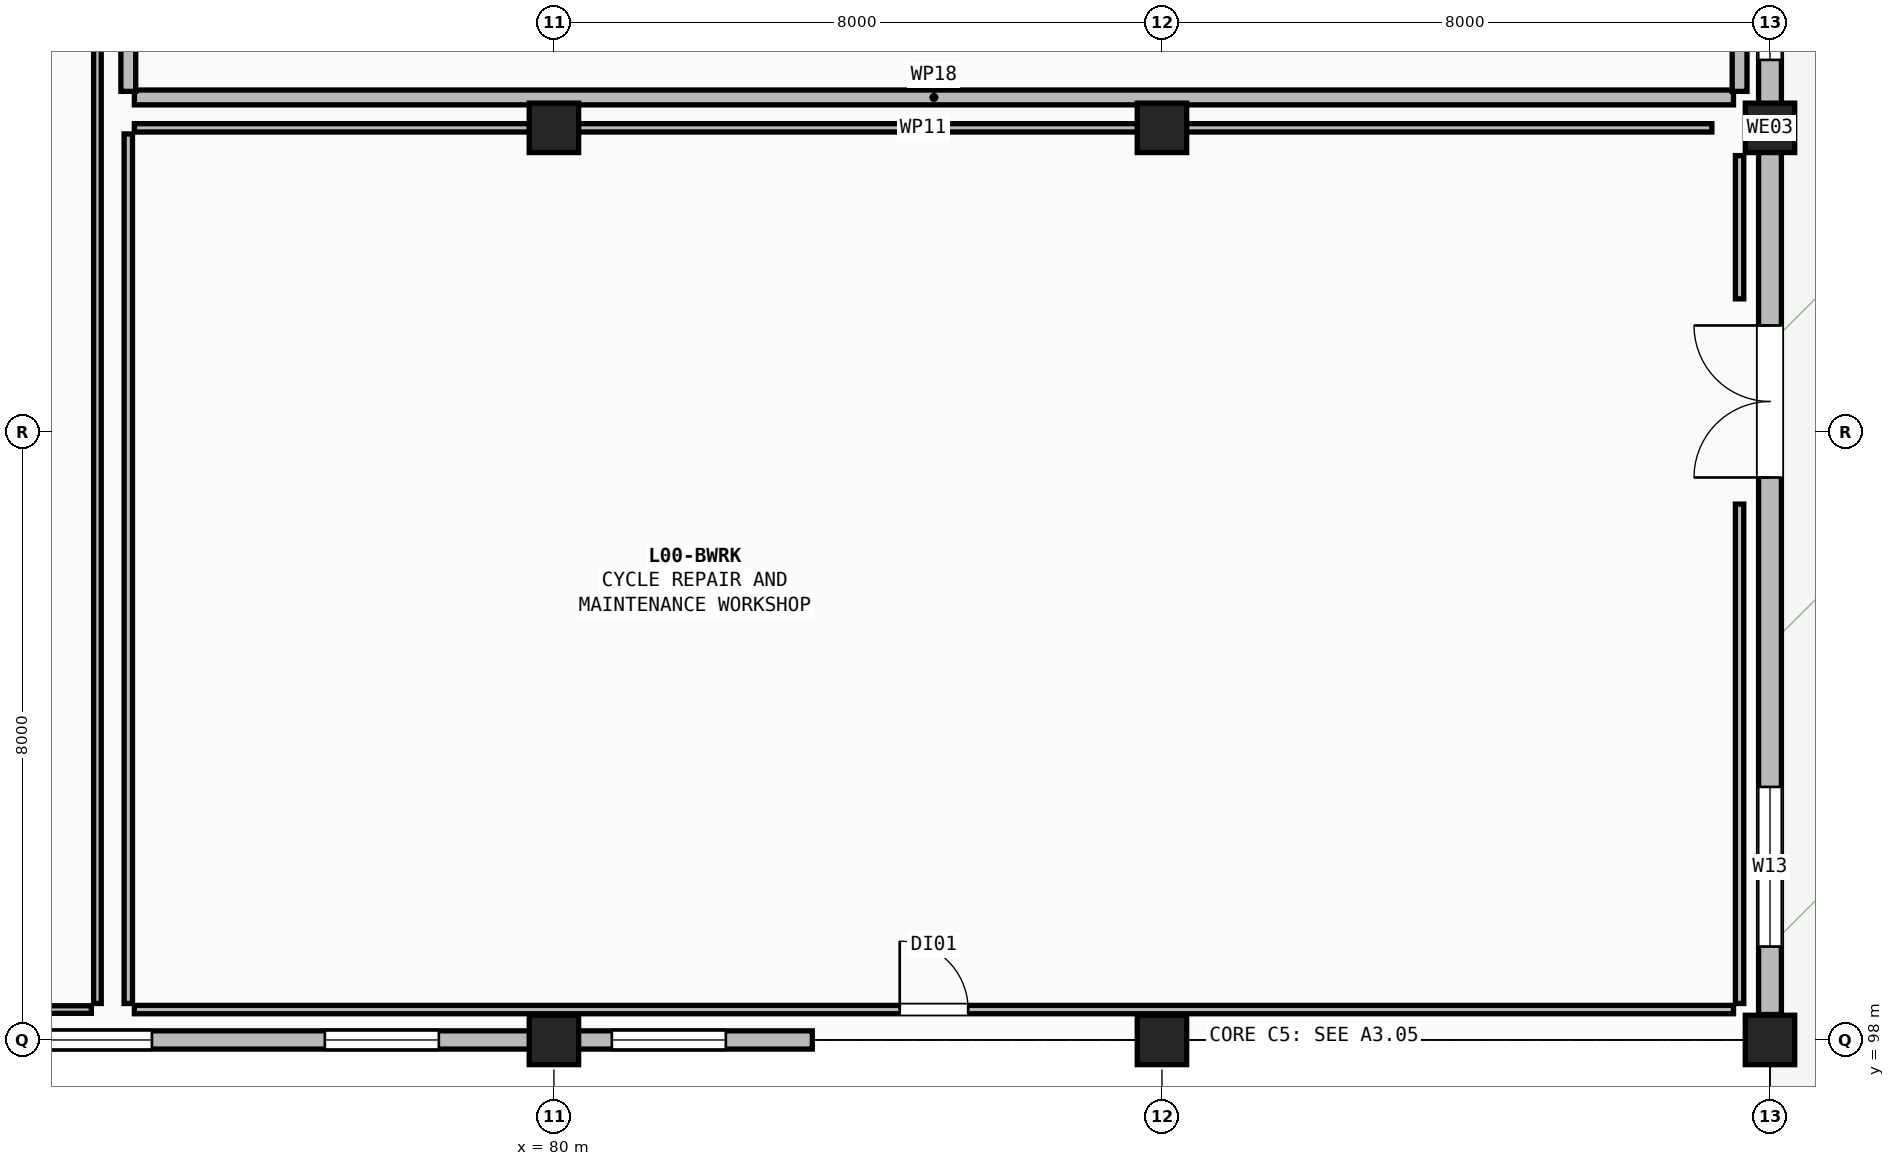
"""IFC4 building model, lengths in metres.
Left out: names, types, materials, properties, quantities, classifications, styles, units other than length and angle.
Written with IfcOpenShell. Run it as: python <this file> out.ifc"""

import sys

from ifc_helpers import new_model, si_unit, direction, frame, frame_2d, origin, origin_2d, place, context, subcontext, project, spatial, rectangle, extrude, element, fill, save


model = new_model("IFC4")
c1 = context("Model", 3, precision=1e-05, world=origin(), true_north=direction((0.0, 1.0)))
c2 = subcontext(c1, "Body", "Model", "MODEL_VIEW")
j1 = project(units=[si_unit("LENGTHUNIT", "METRE"), si_unit("PLANEANGLEUNIT", "RADIAN")], contexts=[c1])
p1 = place(None, origin())
s1 = spatial("IfcSite", under=j1, at=p1, CompositionType="ELEMENT")
p2 = place(p1, origin())
s2 = spatial("IfcBuilding", under=s1, at=p2, CompositionType="ELEMENT")
p3 = place(p2, origin())
s3 = spatial("IfcBuildingStorey", under=s2, at=p3, CompositionType="ELEMENT", Elevation=0.0)
for number, where, z_axis, x_axis in (
    (1, (80.0, 98.0, 0.0), (0.0, 0.0, 1.0), (1.0, 0.0, 0.0)),
    (2, (80.0, 110.0, 0.0), (0.0, 0.0, 1.0), (1.0, 0.0, 0.0)),
    (3, (88.0, 98.0, 0.0), (0.0, 0.0, 1.0), (1.0, 0.0, 0.0)),
    (4, (88.0, 110.0, 0.0), (0.0, 0.0, 1.0), (1.0, 0.0, 0.0)),
    (5, (96.0, 98.0, 0.0), (0.0, 0.0, 1.0), (1.0, 0.0, 0.0)),
    (6, (96.0, 110.0, 0.0), (0.0, 0.0, 1.0), (1.0, 0.0, 0.0)),
):
    element("IfcColumn", number, at=place(p3, frame(where, z_axis=z_axis, x_axis=x_axis)), inside=s3, PredefinedType="COLUMN", context=c2, shape_type="SweptSolid", body=[
        extrude(rectangle(XDim=0.65, YDim=0.65, at=origin_2d()), origin(), (0.0, 0.0, 1.0), 4.5),
    ])
p4 = place(p3, frame((0.335, 98.0, 0.0), z_axis=(0.0, 0.0, 1.0), x_axis=(1.0, 0.0, 0.0)))
e7 = element("IfcWall", 7, at=p4, inside=s3, PredefinedType="SOLIDWALL", context=c2, shape_type="SweptSolid", body=[
    extrude(rectangle(XDim=83.065, YDim=0.24, at=frame_2d((41.532, 0.0))), origin(), (0.0, 0.0, 1.0), 3.245),
])
p5 = place(p4, frame((1.138, 0.0, 0.95)))
e8 = element("IfcOpeningElement", 8, at=p5, cuts=e7, PredefinedType="OPENING", context=c2, shape_type="SweptSolid", body=[
    extrude(rectangle(XDim=1.5, YDim=1.5, at=frame_2d((0.75, 0.75))), frame((0.0, 0.13, 0.0), z_axis=(0.0, -1.0, 0.0), x_axis=(1.0, 0.0, 0.0)), (0.0, 0.0, 1.0), 0.26),
])
p6 = place(p4, frame((4.914, 0.0, 0.95)))
e9 = element("IfcOpeningElement", 9, at=p6, cuts=e7, PredefinedType="OPENING", context=c2, shape_type="SweptSolid", body=[
    extrude(rectangle(XDim=1.5, YDim=1.5, at=frame_2d((0.75, 0.75))), frame((0.0, 0.13, 0.0), z_axis=(0.0, -1.0, 0.0), x_axis=(1.0, 0.0, 0.0)), (0.0, 0.0, 1.0), 0.26),
])
p7 = place(p4, frame((8.689, 0.0, 0.95)))
e10 = element("IfcOpeningElement", 10, at=p7, cuts=e7, PredefinedType="OPENING", context=c2, shape_type="SweptSolid", body=[
    extrude(rectangle(XDim=1.5, YDim=1.5, at=frame_2d((0.75, 0.75))), frame((0.0, 0.13, 0.0), z_axis=(0.0, -1.0, 0.0), x_axis=(1.0, 0.0, 0.0)), (0.0, 0.0, 1.0), 0.26),
])
p8 = place(p4, frame((12.465, 0.0, 0.95)))
e11 = element("IfcOpeningElement", 11, at=p8, cuts=e7, PredefinedType="OPENING", context=c2, shape_type="SweptSolid", body=[
    extrude(rectangle(XDim=1.5, YDim=1.5, at=frame_2d((0.75, 0.75))), frame((0.0, 0.13, 0.0), z_axis=(0.0, -1.0, 0.0), x_axis=(1.0, 0.0, 0.0)), (0.0, 0.0, 1.0), 0.26),
])
p9 = place(p4, frame((16.241, 0.0, 0.95)))
e12 = element("IfcOpeningElement", 12, at=p9, cuts=e7, PredefinedType="OPENING", context=c2, shape_type="SweptSolid", body=[
    extrude(rectangle(XDim=1.5, YDim=1.5, at=frame_2d((0.75, 0.75))), frame((0.0, 0.13, 0.0), z_axis=(0.0, -1.0, 0.0), x_axis=(1.0, 0.0, 0.0)), (0.0, 0.0, 1.0), 0.26),
])
p10 = place(p4, frame((20.016, 0.0, 0.95)))
e13 = element("IfcOpeningElement", 13, at=p10, cuts=e7, PredefinedType="OPENING", context=c2, shape_type="SweptSolid", body=[
    extrude(rectangle(XDim=1.5, YDim=1.5, at=frame_2d((0.75, 0.75))), frame((0.0, 0.13, 0.0), z_axis=(0.0, -1.0, 0.0), x_axis=(1.0, 0.0, 0.0)), (0.0, 0.0, 1.0), 0.26),
])
p11 = place(p4, frame((27.568, 0.0, 0.95)))
e14 = element("IfcOpeningElement", 14, at=p11, cuts=e7, PredefinedType="OPENING", context=c2, shape_type="SweptSolid", body=[
    extrude(rectangle(XDim=1.5, YDim=1.5, at=frame_2d((0.75, 0.75))), frame((0.0, 0.13, 0.0), z_axis=(0.0, -1.0, 0.0), x_axis=(1.0, 0.0, 0.0)), (0.0, 0.0, 1.0), 0.26),
])
p12 = place(p4, frame((35.119, 0.0, 0.95)))
e15 = element("IfcOpeningElement", 15, at=p12, cuts=e7, PredefinedType="OPENING", context=c2, shape_type="SweptSolid", body=[
    extrude(rectangle(XDim=1.5, YDim=1.5, at=frame_2d((0.75, 0.75))), frame((0.0, 0.13, 0.0), z_axis=(0.0, -1.0, 0.0), x_axis=(1.0, 0.0, 0.0)), (0.0, 0.0, 1.0), 0.26),
])
p13 = place(p4, frame((42.67, 0.0, 0.95)))
e16 = element("IfcOpeningElement", 16, at=p13, cuts=e7, PredefinedType="OPENING", context=c2, shape_type="SweptSolid", body=[
    extrude(rectangle(XDim=1.5, YDim=1.5, at=frame_2d((0.75, 0.75))), frame((0.0, 0.13, 0.0), z_axis=(0.0, -1.0, 0.0), x_axis=(1.0, 0.0, 0.0)), (0.0, 0.0, 1.0), 0.26),
])
p14 = place(p4, frame((50.222, 0.0, 0.95)))
e17 = element("IfcOpeningElement", 17, at=p14, cuts=e7, PredefinedType="OPENING", context=c2, shape_type="SweptSolid", body=[
    extrude(rectangle(XDim=1.5, YDim=1.5, at=frame_2d((0.75, 0.75))), frame((0.0, 0.13, 0.0), z_axis=(0.0, -1.0, 0.0), x_axis=(1.0, 0.0, 0.0)), (0.0, 0.0, 1.0), 0.26),
])
p15 = place(p4, frame((57.773, 0.0, 0.95)))
e18 = element("IfcOpeningElement", 18, at=p15, cuts=e7, PredefinedType="OPENING", context=c2, shape_type="SweptSolid", body=[
    extrude(rectangle(XDim=1.5, YDim=1.5, at=frame_2d((0.75, 0.75))), frame((0.0, 0.13, 0.0), z_axis=(0.0, -1.0, 0.0), x_axis=(1.0, 0.0, 0.0)), (0.0, 0.0, 1.0), 0.26),
])
p16 = place(p4, frame((61.549, 0.0, 0.95)))
e19 = element("IfcOpeningElement", 19, at=p16, cuts=e7, PredefinedType="OPENING", context=c2, shape_type="SweptSolid", body=[
    extrude(rectangle(XDim=1.5, YDim=1.5, at=frame_2d((0.75, 0.75))), frame((0.0, 0.13, 0.0), z_axis=(0.0, -1.0, 0.0), x_axis=(1.0, 0.0, 0.0)), (0.0, 0.0, 1.0), 0.26),
])
p17 = place(p4, frame((65.324, 0.0, 0.95)))
e20 = element("IfcOpeningElement", 20, at=p17, cuts=e7, PredefinedType="OPENING", context=c2, shape_type="SweptSolid", body=[
    extrude(rectangle(XDim=1.5, YDim=1.5, at=frame_2d((0.75, 0.75))), frame((0.0, 0.13, 0.0), z_axis=(0.0, -1.0, 0.0), x_axis=(1.0, 0.0, 0.0)), (0.0, 0.0, 1.0), 0.26),
])
p18 = place(p4, frame((69.1, 0.0, 0.95)))
e21 = element("IfcOpeningElement", 21, at=p18, cuts=e7, PredefinedType="OPENING", context=c2, shape_type="SweptSolid", body=[
    extrude(rectangle(XDim=1.5, YDim=1.5, at=frame_2d((0.75, 0.75))), frame((0.0, 0.13, 0.0), z_axis=(0.0, -1.0, 0.0), x_axis=(1.0, 0.0, 0.0)), (0.0, 0.0, 1.0), 0.26),
])
p19 = place(p4, frame((72.876, 0.0, 0.95)))
e22 = element("IfcOpeningElement", 22, at=p19, cuts=e7, PredefinedType="OPENING", context=c2, shape_type="SweptSolid", body=[
    extrude(rectangle(XDim=1.5, YDim=1.5, at=frame_2d((0.75, 0.75))), frame((0.0, 0.13, 0.0), z_axis=(0.0, -1.0, 0.0), x_axis=(1.0, 0.0, 0.0)), (0.0, 0.0, 1.0), 0.26),
])
p20 = place(p4, frame((76.651, 0.0, 0.95)))
e23 = element("IfcOpeningElement", 23, at=p20, cuts=e7, PredefinedType="OPENING", context=c2, shape_type="SweptSolid", body=[
    extrude(rectangle(XDim=1.5, YDim=1.5, at=frame_2d((0.75, 0.75))), frame((0.0, 0.13, 0.0), z_axis=(0.0, -1.0, 0.0), x_axis=(1.0, 0.0, 0.0)), (0.0, 0.0, 1.0), 0.26),
])
p21 = place(p4, frame((80.427, 0.0, 0.95)))
e24 = element("IfcOpeningElement", 24, at=p21, cuts=e7, PredefinedType="OPENING", context=c2, shape_type="SweptSolid", body=[
    extrude(rectangle(XDim=1.5, YDim=1.5, at=frame_2d((0.75, 0.75))), frame((0.0, 0.13, 0.0), z_axis=(0.0, -1.0, 0.0), x_axis=(1.0, 0.0, 0.0)), (0.0, 0.0, 1.0), 0.26),
])
p22 = place(p3, frame((96.0, 98.335, 0.0), z_axis=(0.0, 0.0, 1.0), x_axis=(0.0, 1.0, 0.0)))
e25 = element("IfcWall", 25, at=p22, inside=s3, PredefinedType="SOLIDWALL", context=c2, shape_type="SweptSolid", body=[
    extrude(rectangle(XDim=23.33, YDim=0.3, at=frame_2d((11.665, 0.0))), origin(), (0.0, 0.0, 1.0), 3.245),
])
p23 = place(p22, frame((7.065, 0.0, 0.0)))
e26 = element("IfcOpeningElement", 26, at=p23, cuts=e25, PredefinedType="OPENING", context=c2, shape_type="SweptSolid", body=[
    extrude(rectangle(XDim=2.0, YDim=2.15, at=frame_2d((1.0, 1.075))), frame((0.0, 0.16, 0.0), z_axis=(0.0, -1.0, 0.0), x_axis=(1.0, 0.0, 0.0)), (0.0, 0.0, 1.0), 0.32),
])
p24 = place(p22, frame((0.894, 0.0, 0.95)))
e27 = element("IfcOpeningElement", 27, at=p24, cuts=e25, PredefinedType="OPENING", context=c2, shape_type="SweptSolid", body=[
    extrude(rectangle(XDim=2.1, YDim=1.8, at=frame_2d((1.05, 0.9))), frame((0.0, 0.16, 0.0), z_axis=(0.0, -1.0, 0.0), x_axis=(1.0, 0.0, 0.0)), (0.0, 0.0, 1.0), 0.32),
])
p25 = place(p22, frame((12.559, 0.0, 0.95)))
e28 = element("IfcOpeningElement", 28, at=p25, cuts=e25, PredefinedType="OPENING", context=c2, shape_type="SweptSolid", body=[
    extrude(rectangle(XDim=2.1, YDim=1.8, at=frame_2d((1.05, 0.9))), frame((0.0, 0.16, 0.0), z_axis=(0.0, -1.0, 0.0), x_axis=(1.0, 0.0, 0.0)), (0.0, 0.0, 1.0), 0.32),
])
p26 = place(p22, frame((16.448, 0.0, 0.95)))
e29 = element("IfcOpeningElement", 29, at=p26, cuts=e25, PredefinedType="OPENING", context=c2, shape_type="SweptSolid", body=[
    extrude(rectangle(XDim=2.1, YDim=1.8, at=frame_2d((1.05, 0.9))), frame((0.0, 0.16, 0.0), z_axis=(0.0, -1.0, 0.0), x_axis=(1.0, 0.0, 0.0)), (0.0, 0.0, 1.0), 0.32),
])
p27 = place(p22, frame((20.336, 0.0, 0.95)))
e30 = element("IfcOpeningElement", 30, at=p27, cuts=e25, PredefinedType="OPENING", context=c2, shape_type="SweptSolid", body=[
    extrude(rectangle(XDim=2.1, YDim=1.8, at=frame_2d((1.05, 0.9))), frame((0.0, 0.16, 0.0), z_axis=(0.0, -1.0, 0.0), x_axis=(1.0, 0.0, 0.0)), (0.0, 0.0, 1.0), 0.32),
])
p28 = place(p3, frame((48.48, 98.4, 0.0), z_axis=(0.0, 0.0, 1.0), x_axis=(1.0, 0.0, 0.0)))
e31 = element("IfcWall", 31, at=p28, inside=s3, PredefinedType="PARTITIONING", context=c2, shape_type="SweptSolid", body=[
    extrude(rectangle(XDim=25.434, YDim=0.1, at=frame_2d((12.717, 0.0))), origin(), (0.0, 0.0, 1.0), 3.245),
])
p29 = place(p3, frame((73.994, 98.48, 0.0), z_axis=(0.0, 0.0, 1.0), x_axis=(0.0, 1.0, 0.0)))
e32 = element("IfcWall", 32, at=p29, inside=s3, PredefinedType="PARTITIONING", context=c2, shape_type="SweptSolid", body=[
    extrude(rectangle(XDim=23.034, YDim=0.1, at=frame_2d((11.517, 0.0))), origin(), (0.0, 0.0, 1.0), 3.595),
])
p30 = place(p3, frame((74.48, 98.4, 0.0), z_axis=(0.0, 0.0, 1.0), x_axis=(1.0, 0.0, 0.0)))
e33 = element("IfcWall", 33, at=p30, inside=s3, PredefinedType="PARTITIONING", context=c2, shape_type="SweptSolid", body=[
    extrude(rectangle(XDim=21.04, YDim=0.11, at=frame_2d((10.52, 0.0))), origin(), (0.0, 0.0, 1.0), 3.245),
])
p31 = place(p30, frame((10.07, 0.0, 0.0)))
e34 = element("IfcOpeningElement", 34, at=p31, cuts=e33, PredefinedType="OPENING", context=c2, shape_type="SweptSolid", body=[
    extrude(rectangle(XDim=0.9, YDim=2.1, at=frame_2d((0.45, 1.05))), frame((0.0, 0.065, 0.0), z_axis=(0.0, -1.0, 0.0), x_axis=(1.0, 0.0, 0.0)), (0.0, 0.0, 1.0), 0.13),
])
p32 = place(p3, frame((74.48, 110.0, 0.0), z_axis=(0.0, 0.0, 1.0), x_axis=(1.0, 0.0, 0.0)))
e35 = element("IfcWall", 35, at=p32, inside=s3, PredefinedType="PARTITIONING", context=c2, shape_type="SweptSolid", body=[
    extrude(rectangle(XDim=20.755, YDim=0.11, at=frame_2d((10.377, 0.0))), origin(), (0.0, 0.0, 1.0), 3.245),
])
p33 = place(p3, frame((74.4, 98.48, 0.0), z_axis=(0.0, 0.0, 1.0), x_axis=(0.0, 1.0, 0.0)))
e36 = element("IfcWall", 36, at=p33, inside=s3, PredefinedType="PARTITIONING", context=c2, shape_type="SweptSolid", body=[
    extrude(rectangle(XDim=11.44, YDim=0.11, at=frame_2d((5.72, 0.0))), origin(), (0.0, 0.0, 1.0), 3.595),
])
p34 = place(p3, frame((95.6, 98.48, 0.0), z_axis=(0.0, 0.0, 1.0), x_axis=(0.0, 1.0, 0.0)))
e37 = element("IfcWall", 37, at=p34, inside=s3, PredefinedType="PARTITIONING", context=c2, shape_type="SweptSolid", body=[
    extrude(rectangle(XDim=6.57, YDim=0.11, at=frame_2d((3.285, 0.0))), origin(), (0.0, 0.0, 1.0), 3.245),
])
p35 = place(p3, frame((95.6, 107.75, 0.0), z_axis=(0.0, 0.0, 1.0), x_axis=(0.0, 1.0, 0.0)))
e38 = element("IfcWall", 38, at=p35, inside=s3, PredefinedType="PARTITIONING", context=c2, shape_type="SweptSolid", body=[
    extrude(rectangle(XDim=1.885, YDim=0.11, at=frame_2d((0.942, 0.0))), origin(), (0.0, 0.0, 1.0), 3.245),
])
p36 = place(p3, frame((74.48, 110.4, 0.0), z_axis=(0.0, 0.0, 1.0), x_axis=(1.0, 0.0, 0.0)))
e39 = element("IfcWall", 39, at=p36, inside=s3, PredefinedType="PARTITIONING", context=c2, shape_type="SweptSolid", body=[
    extrude(rectangle(XDim=21.04, YDim=0.195, at=frame_2d((10.52, 0.0))), origin(), (0.0, 0.0, 1.0), 3.245),
])
for number, where, z_axis, x_axis in (
    (40, (74.4, 110.48, 0.0), (0.0, 0.0, 1.0), (0.0, 1.0, 0.0)),
    (41, (95.6, 110.48, 0.0), (0.0, 0.0, 1.0), (0.0, 1.0, 0.0)),
):
    element("IfcWall", number, at=place(p3, frame(where, z_axis=z_axis, x_axis=x_axis)), inside=s3, PredefinedType="PARTITIONING", context=c2, shape_type="SweptSolid", body=[
        extrude(rectangle(XDim=11.04, YDim=0.195, at=frame_2d((5.52, 0.0))), origin(), (0.0, 0.0, 1.0), 4.245),
    ])
p37 = place(p19, origin())
e42 = element("IfcWindow", 42, at=p37, inside=s3, PartitioningType="SINGLE_PANEL", PredefinedType="WINDOW", context=c2, shape_type="SweptSolid", body=[
    extrude(rectangle(XDim=1.5, YDim=1.5, at=frame_2d((0.75, 0.75))), frame((0.0, 0.03, 0.0), z_axis=(0.0, -1.0, 0.0), x_axis=(1.0, 0.0, 0.0)), (0.0, 0.0, 1.0), 0.06),
])
fill(e22, e42)
p38 = place(p20, origin())
e43 = element("IfcWindow", 43, at=p38, inside=s3, PartitioningType="SINGLE_PANEL", PredefinedType="WINDOW", context=c2, shape_type="SweptSolid", body=[
    extrude(rectangle(XDim=1.5, YDim=1.5, at=frame_2d((0.75, 0.75))), frame((0.0, 0.03, 0.0), z_axis=(0.0, -1.0, 0.0), x_axis=(1.0, 0.0, 0.0)), (0.0, 0.0, 1.0), 0.06),
])
fill(e23, e43)
p39 = place(p21, origin())
e44 = element("IfcWindow", 44, at=p39, inside=s3, PartitioningType="SINGLE_PANEL", PredefinedType="WINDOW", context=c2, shape_type="SweptSolid", body=[
    extrude(rectangle(XDim=1.5, YDim=1.5, at=frame_2d((0.75, 0.75))), frame((0.0, 0.03, 0.0), z_axis=(0.0, -1.0, 0.0), x_axis=(1.0, 0.0, 0.0)), (0.0, 0.0, 1.0), 0.06),
])
fill(e24, e44)
p40 = place(p23, origin())
e45 = element("IfcDoor", 45, at=p40, inside=s3, OperationType="DOUBLE_DOOR_SINGLE_SWING", PredefinedType="DOOR", context=c2, shape_type="SweptSolid", body=[
    extrude(rectangle(XDim=2.0, YDim=2.15, at=frame_2d((1.0, 1.075))), frame((0.0, 0.025, 0.0), z_axis=(0.0, -1.0, 0.0), x_axis=(1.0, 0.0, 0.0)), (0.0, 0.0, 1.0), 0.05),
])
fill(e26, e45)
p41 = place(p24, origin())
e46 = element("IfcWindow", 46, at=p41, inside=s3, PartitioningType="SINGLE_PANEL", PredefinedType="WINDOW", context=c2, shape_type="SweptSolid", body=[
    extrude(rectangle(XDim=2.1, YDim=1.8, at=frame_2d((1.05, 0.9))), frame((0.0, 0.03, 0.0), z_axis=(0.0, -1.0, 0.0), x_axis=(1.0, 0.0, 0.0)), (0.0, 0.0, 1.0), 0.06),
])
fill(e27, e46)
p42 = place(p25, origin())
e47 = element("IfcWindow", 47, at=p42, inside=s3, PartitioningType="SINGLE_PANEL", PredefinedType="WINDOW", context=c2, shape_type="SweptSolid", body=[
    extrude(rectangle(XDim=2.1, YDim=1.8, at=frame_2d((1.05, 0.9))), frame((0.0, 0.03, 0.0), z_axis=(0.0, -1.0, 0.0), x_axis=(1.0, 0.0, 0.0)), (0.0, 0.0, 1.0), 0.06),
])
fill(e28, e47)
p43 = place(p31, origin())
e48 = element("IfcDoor", 48, at=p43, inside=s3, OperationType="SINGLE_SWING_LEFT", PredefinedType="DOOR", context=c2, shape_type="SweptSolid", body=[
    extrude(rectangle(XDim=0.9, YDim=2.1, at=frame_2d((0.45, 1.05))), frame((0.0, 0.025, 0.0), z_axis=(0.0, -1.0, 0.0), x_axis=(1.0, 0.0, 0.0)), (0.0, 0.0, 1.0), 0.05),
])
fill(e34, e48)
save(model, sys.argv[1])
